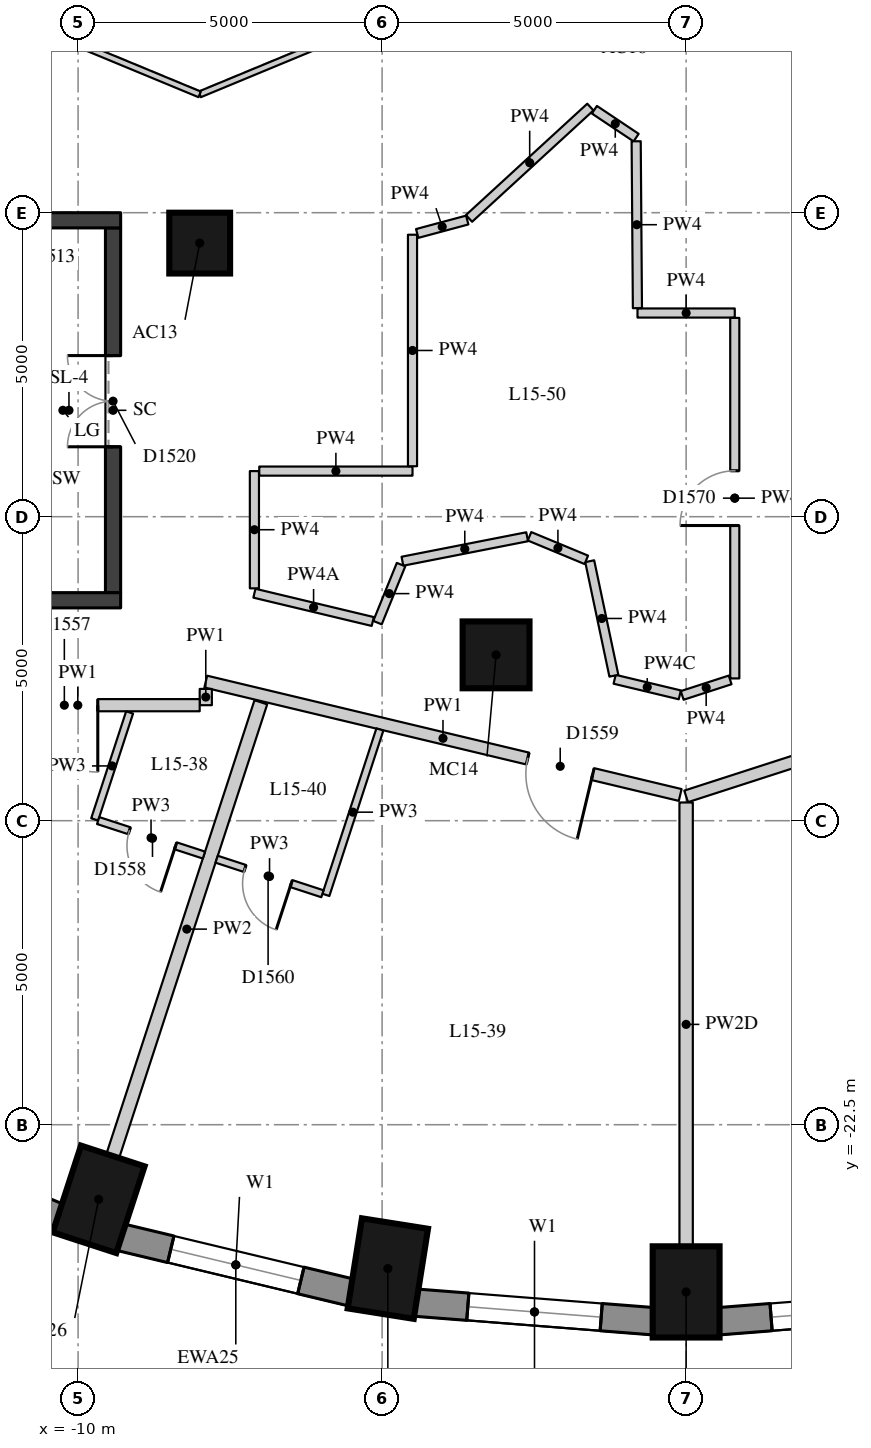
"""IFC4 building model, lengths in metres.
Left out: names, types, materials, properties, quantities, classifications, styles, units other than length and angle.
Written with IfcOpenShell. Run it as: python <this file> out.ifc"""

import sys

from ifc_helpers import new_model, si_unit, direction, frame, frame_2d, origin, origin_2d, place, context, subcontext, project, spatial, rectangle, extrude, element, fill, save


model = new_model("IFC4")
c1 = context("Model", 3, precision=1e-05, world=origin(), true_north=direction((0.0, 1.0)))
c2 = subcontext(c1, "Body", "Model", "MODEL_VIEW")
j1 = project(units=[si_unit("LENGTHUNIT", "METRE"), si_unit("PLANEANGLEUNIT", "RADIAN")], contexts=[c1])
p1 = place(None, origin())
s1 = spatial("IfcSite", under=j1, at=p1, CompositionType="ELEMENT")
p2 = place(p1, origin())
s2 = spatial("IfcBuilding", under=s1, at=p2, CompositionType="ELEMENT")
p3 = place(p2, frame((0.0, 0.0, 58.0)))
s3 = spatial("IfcBuildingStorey", under=s2, at=p3, CompositionType="ELEMENT", Elevation=58.0)
for number, where, z_axis, x_axis in (
    (1, (-9.662, -23.727, 0.0), (0.0, 0.0, 1.0), (-0.31, -0.951, 0.0)),
    (2, (-4.906, -24.866, 0.0), (0.0, 0.0, 1.0), (-0.156, -0.988, 0.0)),
    (3, (0.0, -25.25, 0.0), (0.0, 0.0, 1.0), (0.0, -1.0, 0.0)),
):
    element("IfcColumn", number, at=place(p3, frame(where, z_axis=z_axis, x_axis=x_axis)), inside=s3, PredefinedType="COLUMN", context=c2, shape_type="SweptSolid", body=[
        extrude(rectangle(XDim=1.5, YDim=1.1, at=origin_2d()), origin(), (0.0, 0.0, 1.0), 3.3),
    ])
p4 = place(p3, frame((-8.0, -8.0, 0.0), z_axis=(0.0, 0.0, 1.0), x_axis=(1.0, 0.0, 0.0)))
e4 = element("IfcColumn", 4, at=p4, inside=s3, PredefinedType="COLUMN", context=c2, shape_type="SweptSolid", body=[
    extrude(rectangle(XDim=1.0, YDim=1.0, at=origin_2d()), origin(), (0.0, 0.0, 1.0), 3.3),
])
p5 = place(p3, frame((-3.126, -14.772, 0.0), z_axis=(0.0, 0.0, 1.0), x_axis=(1.0, 0.0, 0.0)))
e5 = element("IfcColumn", 5, at=p5, inside=s3, PredefinedType="COLUMN", context=c2, shape_type="SweptSolid", body=[
    extrude(rectangle(XDim=1.1, YDim=1.1, at=origin_2d()), origin(), (0.0, 0.0, 1.0), 3.3),
])
p6 = place(p3, frame((-13.875, -22.537, 0.0), z_axis=(0.0, 0.0, 1.0), x_axis=(0.923031964282, -0.384723267966, 0.0)))
e6 = element("IfcWall", 6, at=p6, inside=s3, PredefinedType="SOLIDWALL", context=c2, shape_type="SweptSolid", body=[
    extrude(rectangle(XDim=3.856, YDim=0.45, at=frame_2d((1.928, 0.0))), origin(), (0.0, 0.0, 1.0), 3.02),
])
p7 = place(p6, frame((0.828, 0.0, 0.4)))
e7 = element("IfcOpeningElement", 7, at=p7, cuts=e6, PredefinedType="OPENING", context=c2, shape_type="SweptSolid", body=[
    extrude(rectangle(XDim=2.2, YDim=1.75, at=frame_2d((1.1, 0.875))), frame((0.0, 0.235, 0.0), z_axis=(0.0, -1.0, 0.0), x_axis=(1.0, 0.0, 0.0)), (0.0, 0.0, 1.0), 0.47),
])
p8 = place(p3, frame((-9.308, -24.35, 0.0), z_axis=(0.0, 0.0, 1.0), x_axis=(0.972496561493, -0.232917233979, 0.0)))
e8 = element("IfcWall", 8, at=p8, inside=s3, PredefinedType="SOLIDWALL", context=c2, shape_type="SweptSolid", body=[
    extrude(rectangle(XDim=3.911, YDim=0.45, at=frame_2d((1.956, 0.0))), origin(), (0.0, 0.0, 1.0), 3.02),
])
p9 = place(p8, frame((0.855, 0.0, 0.4)))
e9 = element("IfcOpeningElement", 9, at=p9, cuts=e8, PredefinedType="OPENING", context=c2, shape_type="SweptSolid", body=[
    extrude(rectangle(XDim=2.2, YDim=1.75, at=frame_2d((1.1, 0.875))), frame((0.0, 0.235, 0.0), z_axis=(0.0, -1.0, 0.0), x_axis=(1.0, 0.0, 0.0)), (0.0, 0.0, 1.0), 0.47),
])
p10 = place(p3, frame((-4.457, -25.426, 0.0), z_axis=(0.0, 0.0, 1.0), x_axis=(0.996955972145, -0.077966592873, 0.0)))
e10 = element("IfcWall", 10, at=p10, inside=s3, PredefinedType="SOLIDWALL", context=c2, shape_type="SweptSolid", body=[
    extrude(rectangle(XDim=3.939, YDim=0.45, at=frame_2d((1.97, 0.0))), origin(), (0.0, 0.0, 1.0), 3.02),
])
p11 = place(p10, frame((0.87, 0.0, 0.4)))
e11 = element("IfcOpeningElement", 11, at=p11, cuts=e10, PredefinedType="OPENING", context=c2, shape_type="SweptSolid", body=[
    extrude(rectangle(XDim=2.2, YDim=1.75, at=frame_2d((1.1, 0.875))), frame((0.0, 0.235, 0.0), z_axis=(0.0, -1.0, 0.0), x_axis=(1.0, 0.0, 0.0)), (0.0, 0.0, 1.0), 0.47),
])
p12 = place(p3, frame((0.53, -25.733, 0.0), z_axis=(0.0, 0.0, 1.0), x_axis=(0.996955972145, 0.077966592873, 0.0)))
e12 = element("IfcWall", 12, at=p12, inside=s3, PredefinedType="SOLIDWALL", context=c2, shape_type="SweptSolid", body=[
    extrude(rectangle(XDim=3.939, YDim=0.45, at=frame_2d((1.97, 0.0))), origin(), (0.0, 0.0, 1.0), 3.02),
])
p13 = place(p12, frame((0.87, 0.0, 0.4)))
e13 = element("IfcOpeningElement", 13, at=p13, cuts=e12, PredefinedType="OPENING", context=c2, shape_type="SweptSolid", body=[
    extrude(rectangle(XDim=2.2, YDim=1.75, at=frame_2d((1.1, 0.875))), frame((0.0, 0.235, 0.0), z_axis=(0.0, -1.0, 0.0), x_axis=(1.0, 0.0, 0.0)), (0.0, 0.0, 1.0), 0.47),
])
p14 = place(p3, frame((-9.425, -13.75, -0.28), z_axis=(0.0, 0.0, 1.0), x_axis=(0.0, 1.0, 0.0)))
e14 = element("IfcWall", 14, at=p14, inside=s3, PredefinedType="SHEAR", context=c2, shape_type="SweptSolid", body=[
    extrude(rectangle(XDim=6.0, YDim=0.25, at=frame_2d((3.0, 0.0))), origin(), (0.0, 0.0, 1.0), 3.3),
])
p15 = place(p14, frame((2.4, 0.0, 0.28)))
e15 = element("IfcOpeningElement", 15, at=p15, cuts=e14, PredefinedType="OPENING", context=c2, shape_type="SweptSolid", body=[
    extrude(rectangle(XDim=1.5, YDim=2.1, at=frame_2d((0.75, 1.05))), frame((0.0, 0.135, 0.0), z_axis=(0.0, -1.0, 0.0), x_axis=(1.0, 0.0, 0.0)), (0.0, 0.0, 1.0), 0.27),
])
for number, where, z_axis, x_axis in (
    (16, (-14.5, -7.625, -0.28), (0.0, 0.0, 1.0), (1.0, 0.0, 0.0)),
    (17, (-14.5, -13.875, -0.28), (0.0, 0.0, 1.0), (1.0, 0.0, 0.0)),
):
    element("IfcWall", number, at=place(p3, frame(where, z_axis=z_axis, x_axis=x_axis)), inside=s3, PredefinedType="SHEAR", context=c2, shape_type="SweptSolid", body=[
        extrude(rectangle(XDim=5.2, YDim=0.25, at=frame_2d((2.6, 0.0))), origin(), (0.0, 0.0, 1.0), 3.3),
    ])
p16 = place(p3, frame((10.792, -13.612, 0.0), z_axis=(0.0, 0.0, 1.0), x_axis=(-0.951542928403, -0.307515943336, 0.0)))
e18 = element("IfcWall", 18, at=p16, inside=s3, PredefinedType="PARTITIONING", context=c2, shape_type="SweptSolid", body=[
    extrude(rectangle(XDim=11.342, YDim=0.2, at=frame_2d((5.671, 0.0))), origin(), (0.0, 0.0, 1.0), 3.02),
])
p17 = place(p16, frame((3.239, 0.0, 0.0)))
e19 = element("IfcOpeningElement", 19, at=p17, cuts=e18, PredefinedType="OPENING", context=c2, shape_type="SweptSolid", body=[
    extrude(rectangle(XDim=1.1, YDim=2.1, at=frame_2d((0.55, 1.05))), frame((0.0, 0.11, 0.0), z_axis=(0.0, -1.0, 0.0), x_axis=(1.0, 0.0, 0.0)), (0.0, 0.0, 1.0), 0.22),
])
p18 = place(p3, frame((-0.098, -17.077, 0.0), z_axis=(0.0, 0.0, 1.0), x_axis=(-0.972607318404, 0.232454305588, 0.0)))
e20 = element("IfcWall", 20, at=p18, inside=s3, PredefinedType="PARTITIONING", context=c2, shape_type="SweptSolid", body=[
    extrude(rectangle(XDim=8.022, YDim=0.2, at=frame_2d((4.011, 0.0))), origin(), (0.0, 0.0, 1.0), 3.02),
])
p19 = place(p18, frame((1.479, 0.0, 0.0)))
e21 = element("IfcOpeningElement", 21, at=p19, cuts=e20, PredefinedType="OPENING", context=c2, shape_type="SweptSolid", body=[
    extrude(rectangle(XDim=1.1, YDim=2.1, at=frame_2d((0.55, 1.05))), frame((0.0, 0.11, 0.0), z_axis=(0.0, -1.0, 0.0), x_axis=(1.0, 0.0, 0.0)), (0.0, 0.0, 1.0), 0.22),
])
p20 = place(p3, frame((-7.9, -15.332, 0.0), z_axis=(0.0, 0.0, 1.0), x_axis=(0.0, -1.0, 0.0)))
e22 = element("IfcWall", 22, at=p20, inside=s3, PredefinedType="PARTITIONING", context=c2, shape_type="SweptSolid", body=[
    extrude(rectangle(XDim=0.268, YDim=0.2, at=frame_2d((0.134, 0.0))), origin(), (0.0, 0.0, 1.0), 3.02),
])
p21 = place(p3, frame((-8.0, -15.6, 0.0), z_axis=(0.0, 0.0, 1.0), x_axis=(-1.0, 0.0, 0.0)))
e23 = element("IfcWall", 23, at=p21, inside=s3, PredefinedType="PARTITIONING", context=c2, shape_type="SweptSolid", body=[
    extrude(rectangle(XDim=4.009, YDim=0.2, at=frame_2d((2.005, 0.0))), origin(), (0.0, 0.0, 1.0), 3.02),
])
p22 = place(p21, frame((1.676, 0.0, 0.0)))
e24 = element("IfcOpeningElement", 24, at=p22, cuts=e23, PredefinedType="OPENING", context=c2, shape_type="SweptSolid", body=[
    extrude(rectangle(XDim=1.1, YDim=2.1, at=frame_2d((0.55, 1.05))), frame((0.0, 0.11, 0.0), z_axis=(0.0, -1.0, 0.0), x_axis=(1.0, 0.0, 0.0)), (0.0, 0.0, 1.0), 0.22),
])
p23 = place(p3, frame((-0.8, -9.15, 0.0), z_axis=(0.0, 0.0, 1.0), x_axis=(1.0, 0.0, 0.0)))
e25 = element("IfcWall", 25, at=p23, inside=s3, PredefinedType="PARTITIONING", context=c2, shape_type="SweptSolid", body=[
    extrude(rectangle(XDim=1.6, YDim=0.15, at=frame_2d((0.8, 0.0))), origin(), (0.0, 0.0, 1.0), 3.02),
])
p24 = place(p3, frame((0.8, -9.23, 0.0), z_axis=(0.0, 0.0, 1.0), x_axis=(0.0, -1.0, 0.0)))
e26 = element("IfcWall", 26, at=p24, inside=s3, PredefinedType="PARTITIONING", context=c2, shape_type="SweptSolid", body=[
    extrude(rectangle(XDim=5.93, YDim=0.15, at=frame_2d((2.965, 0.0))), origin(), (0.0, 0.0, 1.0), 3.02),
])
p25 = place(p24, frame((2.515, 0.0, 0.0)))
e27 = element("IfcOpeningElement", 27, at=p25, cuts=e26, PredefinedType="OPENING", context=c2, shape_type="SweptSolid", body=[
    extrude(rectangle(XDim=0.9, YDim=2.1, at=frame_2d((0.45, 1.05))), frame((0.0, 0.085, 0.0), z_axis=(0.0, -1.0, 0.0), x_axis=(1.0, 0.0, 0.0)), (0.0, 0.0, 1.0), 0.17),
])
p26 = place(p3, frame((0.724, -15.184, 0.0), z_axis=(0.0, 0.0, 1.0), x_axis=(-0.951444518554, -0.307820285415, 0.0)))
e28 = element("IfcWall", 28, at=p26, inside=s3, PredefinedType="PARTITIONING", context=c2, shape_type="SweptSolid", body=[
    extrude(rectangle(XDim=0.829, YDim=0.15, at=frame_2d((0.415, 0.0))), origin(), (0.0, 0.0, 1.0), 3.02),
])
p27 = place(p3, frame((-0.104, -15.43, 0.0), z_axis=(0.0, 0.0, 1.0), x_axis=(-0.972630060885, 0.232359128642, 0.0)))
e29 = element("IfcWall", 29, at=p27, inside=s3, PredefinedType="PARTITIONING", context=c2, shape_type="SweptSolid", body=[
    extrude(rectangle(XDim=1.102, YDim=0.15, at=frame_2d((0.551, 0.0))), origin(), (0.0, 0.0, 1.0), 2.42),
])
p28 = place(p3, frame((-1.188, -15.115, 0.0), z_axis=(0.0, 0.0, 1.0), x_axis=(-0.20649628494, 0.978447384536, 0.0)))
e30 = element("IfcWall", 30, at=p28, inside=s3, PredefinedType="PARTITIONING", context=c2, shape_type="SweptSolid", body=[
    extrude(rectangle(XDim=1.925, YDim=0.15, at=frame_2d((0.962, 0.0))), origin(), (0.0, 0.0, 1.0), 3.02),
])
p29 = place(p3, frame((-1.641, -13.209, 0.0), z_axis=(0.0, 0.0, 1.0), x_axis=(-0.923725449546, 0.383055209937, 0.0)))
e31 = element("IfcWall", 31, at=p29, inside=s3, PredefinedType="PARTITIONING", context=c2, shape_type="SweptSolid", body=[
    extrude(rectangle(XDim=1.011, YDim=0.15, at=frame_2d((0.506, 0.0))), origin(), (0.0, 0.0, 1.0), 3.02),
])
p30 = place(p3, frame((-2.615, -12.83, 0.0), z_axis=(0.0, 0.0, 1.0), x_axis=(-0.981297312652, -0.192498270593, 0.0)))
e32 = element("IfcWall", 32, at=p30, inside=s3, PredefinedType="PARTITIONING", context=c2, shape_type="SweptSolid", body=[
    extrude(rectangle(XDim=2.09, YDim=0.15, at=frame_2d((1.045, 0.0))), origin(), (0.0, 0.0, 1.0), 3.02),
])
p31 = place(p3, frame((-4.688, -13.288, 0.0), z_axis=(0.0, 0.0, 1.0), x_axis=(-0.375963709287, -0.926634388148, 0.0)))
e33 = element("IfcWall", 33, at=p31, inside=s3, PredefinedType="PARTITIONING", context=c2, shape_type="SweptSolid", body=[
    extrude(rectangle(XDim=1.03, YDim=0.15, at=frame_2d((0.515, 0.0))), origin(), (0.0, 0.0, 1.0), 3.02),
])
p32 = place(p3, frame((-5.154, -14.224, 0.0), z_axis=(0.0, 0.0, 1.0), x_axis=(-0.97258848944, 0.232533073366, 0.0)))
e34 = element("IfcWall", 34, at=p32, inside=s3, PredefinedType="PARTITIONING", context=c2, shape_type="SweptSolid", body=[
    extrude(rectangle(XDim=2.001, YDim=0.15, at=frame_2d((1.0, 0.0))), origin(), (0.0, 0.0, 1.0), 2.57),
])
p33 = place(p3, frame((-7.1, -13.678, 0.0), z_axis=(0.0, 0.0, 1.0), x_axis=(0.0, 1.0, 0.0)))
e35 = element("IfcWall", 35, at=p33, inside=s3, PredefinedType="PARTITIONING", context=c2, shape_type="SweptSolid", body=[
    extrude(rectangle(XDim=1.928, YDim=0.15, at=frame_2d((0.964, 0.0))), origin(), (0.0, 0.0, 1.0), 3.02),
])
p34 = place(p3, frame((-7.02, -11.75, 0.0), z_axis=(0.0, 0.0, 1.0), x_axis=(1.0, 0.0, 0.0)))
e36 = element("IfcWall", 36, at=p34, inside=s3, PredefinedType="PARTITIONING", context=c2, shape_type="SweptSolid", body=[
    extrude(rectangle(XDim=2.52, YDim=0.15, at=frame_2d((1.26, 0.0))), origin(), (0.0, 0.0, 1.0), 3.02),
])
p35 = place(p3, frame((-4.5, -11.67, 0.0), z_axis=(0.0, 0.0, 1.0), x_axis=(0.0, 1.0, 0.0)))
e37 = element("IfcWall", 37, at=p35, inside=s3, PredefinedType="PARTITIONING", context=c2, shape_type="SweptSolid", body=[
    extrude(rectangle(XDim=3.808, YDim=0.15, at=frame_2d((1.904, 0.0))), origin(), (0.0, 0.0, 1.0), 3.02),
])
p36 = place(p3, frame((-4.423, -7.842, 0.0), z_axis=(0.0, 0.0, 1.0), x_axis=(0.965853333569, 0.259089440221, 0.0)))
e38 = element("IfcWall", 38, at=p36, inside=s3, PredefinedType="PARTITIONING", context=c2, shape_type="SweptSolid", body=[
    extrude(rectangle(XDim=0.852, YDim=0.15, at=frame_2d((0.426, 0.0))), origin(), (0.0, 0.0, 1.0), 3.02),
])
p37 = place(p3, frame((-3.571, -7.594, 0.0), z_axis=(0.0, 0.0, 1.0), x_axis=(0.736783660812, 0.676128565555, 0.0)))
e39 = element("IfcWall", 39, at=p37, inside=s3, PredefinedType="PARTITIONING", context=c2, shape_type="SweptSolid", body=[
    extrude(rectangle(XDim=2.709, YDim=0.15, at=frame_2d((1.354, 0.0))), origin(), (0.0, 0.0, 1.0), 3.02),
])
p38 = place(p3, frame((-1.509, -5.806, 0.0), z_axis=(0.0, 0.0, 1.0), x_axis=(0.831367153095, -0.55572354346, 0.0)))
e40 = element("IfcWall", 40, at=p38, inside=s3, PredefinedType="PARTITIONING", context=c2, shape_type="SweptSolid", body=[
    extrude(rectangle(XDim=0.825, YDim=0.15, at=frame_2d((0.413, 0.0))), origin(), (0.0, 0.0, 1.0), 3.02),
])
p39 = place(p3, frame((-0.822, -6.325, 0.0), z_axis=(0.0, 0.0, 1.0), x_axis=(0.007471771501, -0.999972085926, 0.0)))
e41 = element("IfcWall", 41, at=p39, inside=s3, PredefinedType="PARTITIONING", context=c2, shape_type="SweptSolid", body=[
    extrude(rectangle(XDim=2.745, YDim=0.15, at=frame_2d((1.372, 0.0))), origin(), (0.0, 0.0, 1.0), 3.02),
])
p40 = place(p3, frame((-9.429, -23.014, 0.0), z_axis=(0.0, 0.0, 1.0), x_axis=(0.310249775859, 0.950655077607, 0.0)))
e42 = element("IfcWall", 42, at=p40, inside=s3, PredefinedType="PARTITIONING", context=c2, shape_type="SweptSolid", body=[
    extrude(rectangle(XDim=7.85, YDim=0.22, at=frame_2d((3.925, 0.0))), origin(), (0.0, 0.0, 1.0), 3.02),
])
p41 = place(p3, frame((0.0, -24.5, 0.0), z_axis=(0.0, 0.0, 1.0), x_axis=(0.0, 1.0, 0.0)))
e43 = element("IfcWall", 43, at=p41, inside=s3, PredefinedType="PARTITIONING", context=c2, shape_type="SweptSolid", body=[
    extrude(rectangle(XDim=7.3, YDim=0.22, at=frame_2d((3.65, 0.0))), origin(), (0.0, 0.0, 1.0), 2.47),
])
p42 = place(p3, frame((-9.153, -15.719, 0.0), z_axis=(0.0, 0.0, 1.0), x_axis=(-0.310326382186, -0.950630073435, 0.0)))
e44 = element("IfcWall", 44, at=p42, inside=s3, PredefinedType="PARTITIONING", context=c2, shape_type="SweptSolid", body=[
    extrude(rectangle(XDim=1.851, YDim=0.12, at=frame_2d((0.926, 0.0))), origin(), (0.0, 0.0, 1.0), 3.02),
])
p43 = place(p3, frame((-5.037, -15.999, 0.0), z_axis=(0.0, 0.0, 1.0), x_axis=(-0.310181518973, -0.950677350781, 0.0)))
e45 = element("IfcWall", 45, at=p43, inside=s3, PredefinedType="PARTITIONING", context=c2, shape_type="SweptSolid", body=[
    extrude(rectangle(XDim=2.862, YDim=0.12, at=frame_2d((1.431, 0.0))), origin(), (0.0, 0.0, 1.0), 3.02),
])
p44 = place(p3, frame((-9.67, -17.498, 0.0), z_axis=(0.0, 0.0, 1.0), x_axis=(0.950678536911, -0.31017788357, 0.0)))
e46 = element("IfcWall", 46, at=p44, inside=s3, PredefinedType="PARTITIONING", context=c2, shape_type="SweptSolid", body=[
    extrude(rectangle(XDim=1.83, YDim=0.12, at=frame_2d((0.915, 0.0))), origin(), (0.0, 0.0, 1.0), 3.02),
])
p45 = place(p44, frame((0.54, 0.0, 0.0)))
e47 = element("IfcOpeningElement", 47, at=p45, cuts=e46, PredefinedType="OPENING", context=c2, shape_type="SweptSolid", body=[
    extrude(rectangle(XDim=0.8, YDim=2.1, at=frame_2d((0.4, 1.05))), frame((0.0, 0.07, 0.0), z_axis=(0.0, -1.0, 0.0), x_axis=(1.0, 0.0, 0.0)), (0.0, 0.0, 1.0), 0.14),
])
p46 = place(p3, frame((-5.981, -18.701, 0.0), z_axis=(0.0, 0.0, 1.0), x_axis=(-0.950639191072, 0.310298450524, 0.0)))
e48 = element("IfcWall", 48, at=p46, inside=s3, PredefinedType="PARTITIONING", context=c2, shape_type="SweptSolid", body=[
    extrude(rectangle(XDim=1.83, YDim=0.12, at=frame_2d((0.915, 0.0))), origin(), (0.0, 0.0, 1.0), 3.02),
])
p47 = place(p46, frame((0.54, 0.0, 0.0)))
e49 = element("IfcOpeningElement", 49, at=p47, cuts=e48, PredefinedType="OPENING", context=c2, shape_type="SweptSolid", body=[
    extrude(rectangle(XDim=0.8, YDim=2.1, at=frame_2d((0.4, 1.05))), frame((0.0, 0.07, 0.0), z_axis=(0.0, -1.0, 0.0), x_axis=(1.0, 0.0, 0.0)), (0.0, 0.0, 1.0), 0.14),
])
for number, where, z_axis, x_axis in (
    (50, (-4.073, -3.927, 0.0), (0.0, 0.0, 1.0), (-0.924, -0.383, 0.0)),
    (51, (-8.0, -5.554, 0.0), (0.0, 0.0, 1.0), (-0.924, 0.383, 0.0)),
):
    element("IfcWall", number, at=place(p3, frame(where, z_axis=z_axis, x_axis=x_axis)), inside=s3, PredefinedType="PARTITIONING", context=c2, shape_type="SweptSolid", body=[
        extrude(rectangle(XDim=4.251, YDim=0.1, at=frame_2d((2.125, 0.0))), origin(), (0.0, 0.0, 1.0), 3.02),
    ])
p48 = place(p9, origin())
e52 = element("IfcWindow", 52, at=p48, inside=s3, PartitioningType="SINGLE_PANEL", PredefinedType="WINDOW", context=c2, shape_type="SweptSolid", body=[
    extrude(rectangle(XDim=2.2, YDim=1.75, at=frame_2d((1.1, 0.875))), frame((0.0, 0.035, 0.0), z_axis=(0.0, -1.0, 0.0), x_axis=(1.0, 0.0, 0.0)), (0.0, 0.0, 1.0), 0.06),
])
fill(e9, e52)
p49 = place(p11, origin())
e53 = element("IfcWindow", 53, at=p49, inside=s3, PartitioningType="SINGLE_PANEL", PredefinedType="WINDOW", context=c2, shape_type="SweptSolid", body=[
    extrude(rectangle(XDim=2.2, YDim=1.75, at=frame_2d((1.1, 0.875))), frame((0.0, 0.035, 0.0), z_axis=(0.0, -1.0, 0.0), x_axis=(1.0, 0.0, 0.0)), (0.0, 0.0, 1.0), 0.06),
])
fill(e11, e53)
p50 = place(p13, origin())
e54 = element("IfcWindow", 54, at=p50, inside=s3, PartitioningType="SINGLE_PANEL", PredefinedType="WINDOW", context=c2, shape_type="SweptSolid", body=[
    extrude(rectangle(XDim=2.2, YDim=1.75, at=frame_2d((1.1, 0.875))), frame((0.0, 0.035, 0.0), z_axis=(0.0, -1.0, 0.0), x_axis=(1.0, 0.0, 0.0)), (0.0, 0.0, 1.0), 0.06),
])
fill(e13, e54)
p51 = place(p15, origin())
e55 = element("IfcDoor", 55, at=p51, inside=s3, OperationType="DOUBLE_DOOR_SINGLE_SWING", PredefinedType="DOOR", context=c2, shape_type="SweptSolid", body=[
    extrude(rectangle(XDim=1.5, YDim=2.1, at=frame_2d((0.75, 1.05))), frame((0.0, 0.025, 0.0), z_axis=(0.0, -1.0, 0.0), x_axis=(1.0, 0.0, 0.0)), (0.0, 0.0, 1.0), 0.05),
])
fill(e15, e55)
p52 = place(p22, origin())
e56 = element("IfcDoor", 56, at=p52, inside=s3, OperationType="SINGLE_SWING_LEFT", PredefinedType="DOOR", context=c2, shape_type="SweptSolid", body=[
    extrude(rectangle(XDim=1.1, YDim=2.1, at=frame_2d((0.55, 1.05))), frame((0.0, 0.025, 0.0), z_axis=(0.0, -1.0, 0.0), x_axis=(1.0, 0.0, 0.0)), (0.0, 0.0, 1.0), 0.05),
])
fill(e24, e56)
p53 = place(p45, origin())
e57 = element("IfcDoor", 57, at=p53, inside=s3, OperationType="SINGLE_SWING_LEFT", PredefinedType="DOOR", context=c2, shape_type="SweptSolid", body=[
    extrude(rectangle(XDim=0.8, YDim=2.1, at=frame_2d((0.4, 1.05))), frame((0.0, 0.025, 0.0), z_axis=(0.0, -1.0, 0.0), x_axis=(1.0, 0.0, 0.0)), (0.0, 0.0, 1.0), 0.05),
])
fill(e47, e57)
p54 = place(p19, origin())
e58 = element("IfcDoor", 58, at=p54, inside=s3, OperationType="SINGLE_SWING_LEFT", PredefinedType="DOOR", context=c2, shape_type="SweptSolid", body=[
    extrude(rectangle(XDim=1.1, YDim=2.1, at=frame_2d((0.55, 1.05))), frame((0.0, 0.025, 0.0), z_axis=(0.0, -1.0, 0.0), x_axis=(1.0, 0.0, 0.0)), (0.0, 0.0, 1.0), 0.05),
])
fill(e21, e58)
p55 = place(p47, origin())
e59 = element("IfcDoor", 59, at=p55, inside=s3, OperationType="SINGLE_SWING_LEFT", PredefinedType="DOOR", context=c2, shape_type="SweptSolid", body=[
    extrude(rectangle(XDim=0.8, YDim=2.1, at=frame_2d((0.4, 1.05))), frame((0.0, 0.025, 0.0), z_axis=(0.0, -1.0, 0.0), x_axis=(1.0, 0.0, 0.0)), (0.0, 0.0, 1.0), 0.05),
])
fill(e49, e59)
p56 = place(p25, origin())
e60 = element("IfcDoor", 60, at=p56, inside=s3, OperationType="SINGLE_SWING_LEFT", PredefinedType="DOOR", context=c2, shape_type="SweptSolid", body=[
    extrude(rectangle(XDim=0.9, YDim=2.1, at=frame_2d((0.45, 1.05))), frame((0.0, 0.025, 0.0), z_axis=(0.0, -1.0, 0.0), x_axis=(1.0, 0.0, 0.0)), (0.0, 0.0, 1.0), 0.05),
])
fill(e27, e60)
save(model, sys.argv[1])
